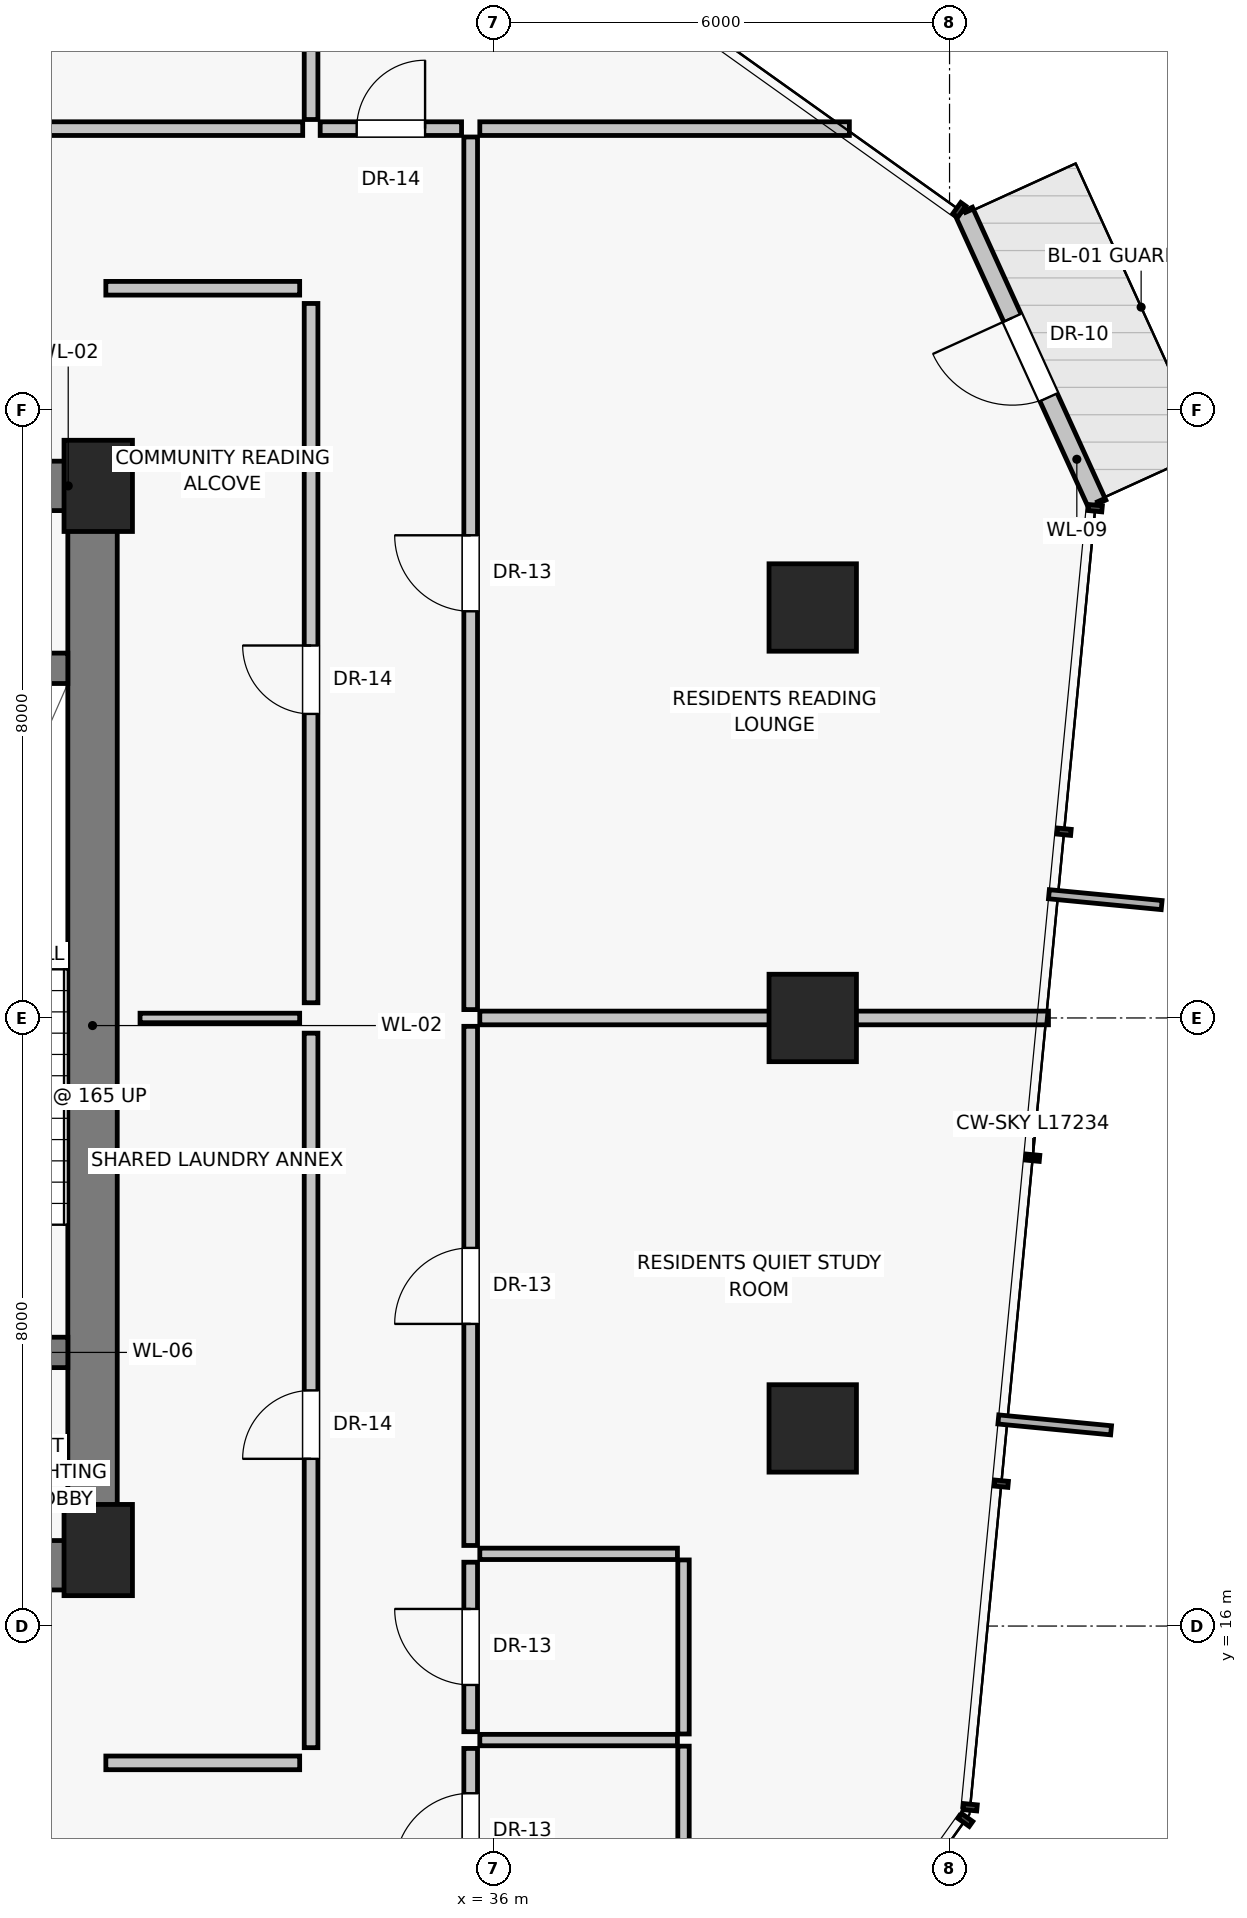
"""IFC4 building model, lengths in metres.
Left out: names, types, materials, properties, quantities, classifications, styles, units other than length and angle.
Written with IfcOpenShell. Run it as: python <this file> out.ifc"""

import sys

from ifc_helpers import new_model, si_unit, direction, frame, frame_2d, origin, origin_2d, place, context, subcontext, project, spatial, rectangle, extrude, source, transform, mapped, element, fill, save


model = new_model("IFC4")
c1 = context("Model", 3, precision=1e-05, world=origin(), true_north=direction((0.0, 1.0)))
c2 = subcontext(c1, "Body", "Model", "MODEL_VIEW")
j1 = project(units=[si_unit("LENGTHUNIT", "METRE"), si_unit("PLANEANGLEUNIT", "RADIAN")], contexts=[c1])
p1 = place(None, origin())
s1 = spatial("IfcSite", under=j1, at=p1, CompositionType="ELEMENT")
p2 = place(p1, origin())
s2 = spatial("IfcBuilding", under=s1, at=p2, CompositionType="ELEMENT")
p3 = place(p2, frame((0.0, 0.0, 108.95)))
s3 = spatial("IfcBuildingStorey", under=s2, at=p3, CompositionType="ELEMENT", Elevation=108.95)
for number, where, z_axis, x_axis in (
    (1, (30.8, 17.0, 0.0), (0.0, 0.0, 1.0), (1.0, 0.0, 0.0)),
    (2, (30.8, 31.0, 0.0), (0.0, 0.0, 1.0), (1.0, 0.0, 0.0)),
):
    element("IfcColumn", number, at=place(p3, frame(where, z_axis=z_axis, x_axis=x_axis)), inside=s3, PredefinedType="PILASTER", context=c2, shape_type="SweptSolid", body=[
        extrude(rectangle(XDim=0.9, YDim=1.2, at=origin_2d()), origin(), (0.0, 0.0, 1.0), 4.3),
    ])
for number, where, z_axis, x_axis in (
    (3, (40.2, 18.6, 0.0), (0.0, 0.0, 1.0), (1.0, 0.0, 0.0)),
    (4, (40.2, 24.0, 0.0), (0.0, 0.0, 1.0), (1.0, 0.0, 0.0)),
    (5, (40.2, 29.4, 0.0), (0.0, 0.0, 1.0), (1.0, 0.0, 0.0)),
):
    element("IfcColumn", number, at=place(p3, frame(where, z_axis=z_axis, x_axis=x_axis)), inside=s3, PredefinedType="COLUMN", context=c2, shape_type="SweptSolid", body=[
        extrude(rectangle(XDim=1.15, YDim=1.15, at=origin_2d()), origin(), (0.0, 0.0, 1.0), 4.3),
    ])
p4 = place(p3, frame((43.942, 30.762, 0.0), z_axis=(0.0, 0.0, 1.0), x_axis=(-0.414671807114, 0.909971039311, 0.0)))
e6 = element("IfcWall", 6, at=p4, inside=s3, PredefinedType="SOLIDWALL", context=c2, shape_type="SweptSolid", body=[
    extrude(rectangle(XDim=4.233, YDim=0.25, at=frame_2d((2.117, 0.0))), origin(), (0.0, 0.0, 1.0), 4.05),
])
p5 = place(p4, frame((1.542, 0.0, 0.0)))
e7 = element("IfcOpeningElement", 7, at=p5, cuts=e6, PredefinedType="OPENING", context=c2, shape_type="SweptSolid", body=[
    extrude(rectangle(XDim=1.15, YDim=2.25, at=frame_2d((0.575, 1.125))), frame((0.0, 0.135, 0.0), z_axis=(0.0, -1.0, 0.0), x_axis=(1.0, 0.0, 0.0)), (0.0, 0.0, 1.0), 0.27),
])
p6 = place(p3, frame((30.725, 16.8, 0.0), z_axis=(0.0, 0.0, 1.0), x_axis=(0.0, 1.0, 0.0)))
e8 = element("IfcWall", 8, at=p6, inside=s3, PredefinedType="SHEAR", context=c2, shape_type="SweptSolid", body=[
    extrude(rectangle(XDim=14.2, YDim=0.65, at=frame_2d((7.1, 0.0))), origin(), (0.0, 0.0, 1.0), 4.05),
])
p7 = place(p3, frame((24.95, 16.8, 0.0), z_axis=(0.0, 0.0, 1.0), x_axis=(1.0, 0.0, 0.0)))
e9 = element("IfcWall", 9, at=p7, inside=s3, PredefinedType="SHEAR", context=c2, shape_type="SweptSolid", body=[
    extrude(rectangle(XDim=5.85, YDim=0.65, at=frame_2d((2.925, 0.0))), origin(), (0.0, 0.0, 1.0), 4.05),
])
p8 = place(p7, frame((2.15, 0.0, 0.0)))
e10 = element("IfcOpeningElement", 10, at=p8, cuts=e9, PredefinedType="OPENING", context=c2, shape_type="SweptSolid", body=[
    extrude(rectangle(XDim=1.2, YDim=2.03, at=frame_2d((0.6, 1.015))), frame((0.0, 0.335, 0.0), z_axis=(0.0, -1.0, 0.0), x_axis=(1.0, 0.0, 0.0)), (0.0, 0.0, 1.0), 0.67),
])
p9 = place(p3, frame((27.0, 31.0, 0.0), z_axis=(0.0, 0.0, 1.0), x_axis=(1.0, 0.0, 0.0)))
e11 = element("IfcWall", 11, at=p9, inside=s3, PredefinedType="SHEAR", context=c2, shape_type="SweptSolid", body=[
    extrude(rectangle(XDim=3.8, YDim=0.65, at=frame_2d((1.9, 0.0))), origin(), (0.0, 0.0, 1.0), 4.05),
])
p10 = place(p9, frame((0.45, 0.0, 0.0)))
e12 = element("IfcOpeningElement", 12, at=p10, cuts=e11, PredefinedType="OPENING", context=c2, shape_type="SweptSolid", body=[
    extrude(rectangle(XDim=0.86, YDim=2.01, at=frame_2d((0.43, 1.005))), frame((0.0, 0.335, 0.0), z_axis=(0.0, -1.0, 0.0), x_axis=(1.0, 0.0, 0.0)), (0.0, 0.0, 1.0), 0.67),
])
p11 = place(p9, frame((1.9, 0.0, 0.0)))
e13 = element("IfcOpeningElement", 13, at=p11, cuts=e11, PredefinedType="OPENING", context=c2, shape_type="SweptSolid", body=[
    extrude(rectangle(XDim=0.86, YDim=2.01, at=frame_2d((0.43, 1.005))), frame((0.0, 0.335, 0.0), z_axis=(0.0, -1.0, 0.0), x_axis=(1.0, 0.0, 0.0)), (0.0, 0.0, 1.0), 0.67),
])
p12 = place(p3, frame((27.0, 19.6, 0.0), z_axis=(0.0, 0.0, 1.0), x_axis=(1.0, 0.0, 0.0)))
e14 = element("IfcWall", 14, at=p12, inside=s3, PredefinedType="SHEAR", context=c2, shape_type="SweptSolid", body=[
    extrude(rectangle(XDim=3.4, YDim=0.4, at=frame_2d((1.7, 0.0))), origin(), (0.0, 0.0, 1.0), 4.05),
])
p13 = place(p12, frame((1.05, 0.0, 0.0)))
e15 = element("IfcOpeningElement", 15, at=p13, cuts=e14, PredefinedType="OPENING", context=c2, shape_type="SweptSolid", body=[
    extrude(rectangle(XDim=1.1, YDim=2.03, at=frame_2d((0.55, 1.015))), frame((0.0, 0.21, 0.0), z_axis=(0.0, -1.0, 0.0), x_axis=(1.0, 0.0, 0.0)), (0.0, 0.0, 1.0), 0.42),
])
p14 = place(p3, frame((27.0, 28.6, 0.0), z_axis=(0.0, 0.0, 1.0), x_axis=(1.0, 0.0, 0.0)))
e16 = element("IfcWall", 16, at=p14, inside=s3, PredefinedType="SHEAR", context=c2, shape_type="SweptSolid", body=[
    extrude(rectangle(XDim=3.4, YDim=0.4, at=frame_2d((1.7, 0.0))), origin(), (0.0, 0.0, 1.0), 4.05),
])
p15 = place(p3, frame((33.6, 14.4, 0.0), z_axis=(0.0, 0.0, 1.0), x_axis=(0.0, 1.0, 0.0)))
e17 = element("IfcWall", 17, at=p15, inside=s3, PredefinedType="PARTITIONING", context=c2, shape_type="SweptSolid", body=[
    extrude(rectangle(XDim=9.4, YDim=0.18, at=frame_2d((4.7, 0.0))), origin(), (0.0, 0.0, 1.0), 4.05),
])
p16 = place(p15, frame((3.8, 0.0, 0.0)))
e18 = element("IfcOpeningElement", 18, at=p16, cuts=e17, PredefinedType="OPENING", context=c2, shape_type="SweptSolid", body=[
    extrude(rectangle(XDim=0.9, YDim=2.01, at=frame_2d((0.45, 1.005))), frame((0.0, 0.1, 0.0), z_axis=(0.0, -1.0, 0.0), x_axis=(1.0, 0.0, 0.0)), (0.0, 0.0, 1.0), 0.2),
])
p17 = place(p3, frame((33.6, 24.2, 0.0), z_axis=(0.0, 0.0, 1.0), x_axis=(0.0, 1.0, 0.0)))
e19 = element("IfcWall", 19, at=p17, inside=s3, PredefinedType="PARTITIONING", context=c2, shape_type="SweptSolid", body=[
    extrude(rectangle(XDim=9.2, YDim=0.18, at=frame_2d((4.6, 0.0))), origin(), (0.0, 0.0, 1.0), 4.05),
])
p18 = place(p17, frame((3.8, 0.0, 0.0)))
e20 = element("IfcOpeningElement", 20, at=p18, cuts=e19, PredefinedType="OPENING", context=c2, shape_type="SweptSolid", body=[
    extrude(rectangle(XDim=0.9, YDim=2.01, at=frame_2d((0.45, 1.005))), frame((0.0, 0.1, 0.0), z_axis=(0.0, -1.0, 0.0), x_axis=(1.0, 0.0, 0.0)), (0.0, 0.0, 1.0), 0.2),
])
p19 = place(p3, frame((31.35, 24.0, 0.0), z_axis=(0.0, 0.0, 1.0), x_axis=(1.0, 0.0, 0.0)))
e21 = element("IfcWall", 21, at=p19, inside=s3, PredefinedType="PARTITIONING", context=c2, shape_type="SweptSolid", body=[
    extrude(rectangle(XDim=2.1, YDim=0.125, at=frame_2d((1.05, 0.0))), origin(), (0.0, 0.0, 1.0), 4.05),
])
for number, where, z_axis, x_axis in (
    (22, (30.9, 14.2, 0.0), (0.0, 0.0, 1.0), (1.0, 0.0, 0.0)),
    (23, (30.9, 33.6, 0.0), (0.0, 0.0, 1.0), (1.0, 0.0, 0.0)),
):
    element("IfcWall", number, at=place(p3, frame(where, z_axis=z_axis, x_axis=x_axis)), inside=s3, PredefinedType="PARTITIONING", context=c2, shape_type="SweptSolid", body=[
        extrude(rectangle(XDim=2.55, YDim=0.18, at=frame_2d((1.275, 0.0))), origin(), (0.0, 0.0, 1.0), 4.05),
    ])
p20 = place(p3, frame((33.6, 35.82, 0.0), z_axis=(0.0, 0.0, 1.0), x_axis=(0.0, 1.0, 0.0)))
e24 = element("IfcWall", 24, at=p20, inside=s3, PredefinedType="PARTITIONING", context=c2, shape_type="SweptSolid", body=[
    extrude(rectangle(XDim=4.932, YDim=0.18, at=frame_2d((2.466, 0.0))), origin(), (0.0, 0.0, 1.0), 4.05),
])
p21 = place(p3, frame((25.454, 35.7, 0.0), z_axis=(0.0, 0.0, 1.0), x_axis=(1.0, 0.0, 0.0)))
e25 = element("IfcWall", 25, at=p21, inside=s3, PredefinedType="PARTITIONING", context=c2, shape_type="SweptSolid", body=[
    extrude(rectangle(XDim=8.036, YDim=0.18, at=frame_2d((4.018, 0.0))), origin(), (0.0, 0.0, 1.0), 3.63),
])
p22 = place(p21, frame((3.518, 0.0, 0.0)))
e26 = element("IfcOpeningElement", 26, at=p22, cuts=e25, PredefinedType="OPENING", context=c2, shape_type="SweptSolid", body=[
    extrude(rectangle(XDim=1.0, YDim=2.01, at=frame_2d((0.5, 1.005))), frame((0.0, 0.1, 0.0), z_axis=(0.0, -1.0, 0.0), x_axis=(1.0, 0.0, 0.0)), (0.0, 0.0, 1.0), 0.2),
])
p23 = place(p3, frame((35.82, 35.7, 0.0), z_axis=(0.0, 0.0, 1.0), x_axis=(1.0, 0.0, 0.0)))
e27 = element("IfcWall", 27, at=p23, inside=s3, PredefinedType="PARTITIONING", context=c2, shape_type="SweptSolid", body=[
    extrude(rectangle(XDim=4.862, YDim=0.18, at=frame_2d((2.431, 0.0))), origin(), (0.0, 0.0, 1.0), 4.05),
])
p24 = place(p3, frame((35.7, 12.21, 0.0), z_axis=(0.0, 0.0, 1.0), x_axis=(0.0, 1.0, 0.0)))
e28 = element("IfcWall", 28, at=p24, inside=s3, PredefinedType="PARTITIONING", context=c2, shape_type="SweptSolid", body=[
    extrude(rectangle(XDim=2.18, YDim=0.18, at=frame_2d((1.09, 0.0))), origin(), (0.0, 0.0, 1.0), 4.05),
])
p25 = place(p24, frame((0.59, 0.0, 0.0)))
e29 = element("IfcOpeningElement", 29, at=p25, cuts=e28, PredefinedType="OPENING", context=c2, shape_type="SweptSolid", body=[
    extrude(rectangle(XDim=1.0, YDim=2.01, at=frame_2d((0.5, 1.005))), frame((0.0, 0.1, 0.0), z_axis=(0.0, -1.0, 0.0), x_axis=(1.0, 0.0, 0.0)), (0.0, 0.0, 1.0), 0.2),
])
p26 = place(p3, frame((35.7, 14.61, 0.0), z_axis=(0.0, 0.0, 1.0), x_axis=(0.0, 1.0, 0.0)))
e30 = element("IfcWall", 30, at=p26, inside=s3, PredefinedType="PARTITIONING", context=c2, shape_type="SweptSolid", body=[
    extrude(rectangle(XDim=2.23, YDim=0.18, at=frame_2d((1.115, 0.0))), origin(), (0.0, 0.0, 1.0), 4.05),
])
p27 = place(p26, frame((0.615, 0.0, 0.0)))
e31 = element("IfcOpeningElement", 31, at=p27, cuts=e30, PredefinedType="OPENING", context=c2, shape_type="SweptSolid", body=[
    extrude(rectangle(XDim=1.0, YDim=2.01, at=frame_2d((0.5, 1.005))), frame((0.0, 0.1, 0.0), z_axis=(0.0, -1.0, 0.0), x_axis=(1.0, 0.0, 0.0)), (0.0, 0.0, 1.0), 0.2),
])
p28 = place(p3, frame((35.7, 17.06, 0.0), z_axis=(0.0, 0.0, 1.0), x_axis=(0.0, 1.0, 0.0)))
e32 = element("IfcWall", 32, at=p28, inside=s3, PredefinedType="PARTITIONING", context=c2, shape_type="SweptSolid", body=[
    extrude(rectangle(XDim=6.83, YDim=0.18, at=frame_2d((3.415, 0.0))), origin(), (0.0, 0.0, 1.0), 3.63),
])
p29 = place(p28, frame((2.915, 0.0, 0.0)))
e33 = element("IfcOpeningElement", 33, at=p29, cuts=e32, PredefinedType="OPENING", context=c2, shape_type="SweptSolid", body=[
    extrude(rectangle(XDim=1.0, YDim=2.01, at=frame_2d((0.5, 1.005))), frame((0.0, 0.1, 0.0), z_axis=(0.0, -1.0, 0.0), x_axis=(1.0, 0.0, 0.0)), (0.0, 0.0, 1.0), 0.2),
])
p30 = place(p3, frame((35.7, 24.11, 0.0), z_axis=(0.0, 0.0, 1.0), x_axis=(0.0, 1.0, 0.0)))
e34 = element("IfcWall", 34, at=p30, inside=s3, PredefinedType="PARTITIONING", context=c2, shape_type="SweptSolid", body=[
    extrude(rectangle(XDim=11.48, YDim=0.18, at=frame_2d((5.74, 0.0))), origin(), (0.0, 0.0, 1.0), 3.63),
])
p31 = place(p30, frame((5.24, 0.0, 0.0)))
e35 = element("IfcOpeningElement", 35, at=p31, cuts=e34, PredefinedType="OPENING", context=c2, shape_type="SweptSolid", body=[
    extrude(rectangle(XDim=1.0, YDim=2.01, at=frame_2d((0.5, 1.005))), frame((0.0, 0.1, 0.0), z_axis=(0.0, -1.0, 0.0), x_axis=(1.0, 0.0, 0.0)), (0.0, 0.0, 1.0), 0.2),
])
for number, where, z_axis, x_axis in (
    (36, (35.82, 14.5, 0.0), (0.0, 0.0, 1.0), (1.0, 0.0, 0.0)),
    (37, (35.82, 16.95, 0.0), (0.0, 0.0, 1.0), (1.0, 0.0, 0.0)),
):
    element("IfcWall", number, at=place(p3, frame(where, z_axis=z_axis, x_axis=x_axis)), inside=s3, PredefinedType="PARTITIONING", context=c2, shape_type="SweptSolid", body=[
        extrude(rectangle(XDim=2.6, YDim=0.15, at=frame_2d((1.3, 0.0))), origin(), (0.0, 0.0, 1.0), 4.05),
    ])
p32 = place(p3, frame((38.5, 12.22, 0.0), z_axis=(0.0, 0.0, 1.0), x_axis=(0.0, 1.0, 0.0)))
e38 = element("IfcWall", 38, at=p32, inside=s3, PredefinedType="PARTITIONING", context=c2, shape_type="SweptSolid", body=[
    extrude(rectangle(XDim=2.2, YDim=0.15, at=frame_2d((1.1, 0.0))), origin(), (0.0, 0.0, 1.0), 4.05),
])
p33 = place(p3, frame((38.5, 14.58, 0.0), z_axis=(0.0, 0.0, 1.0), x_axis=(0.0, 1.0, 0.0)))
e39 = element("IfcWall", 39, at=p33, inside=s3, PredefinedType="PARTITIONING", context=c2, shape_type="SweptSolid", body=[
    extrude(rectangle(XDim=2.29, YDim=0.15, at=frame_2d((1.145, 0.0))), origin(), (0.0, 0.0, 1.0), 4.05),
])
p34 = place(p3, frame((35.82, 24.0, 0.0), z_axis=(0.0, 0.0, 1.0), x_axis=(1.0, 0.0, 0.0)))
e40 = element("IfcWall", 40, at=p34, inside=s3, PredefinedType="PARTITIONING", context=c2, shape_type="SweptSolid", body=[
    extrude(rectangle(XDim=7.481, YDim=0.18, at=frame_2d((3.741, 0.0))), origin(), (0.0, 0.0, 1.0), 4.05),
])
p35 = place(p3, frame((33.72, 35.7, 0.0), z_axis=(0.0, 0.0, 1.0), x_axis=(1.0, 0.0, 0.0)))
e41 = element("IfcWall", 41, at=p35, inside=s3, PredefinedType="PARTITIONING", context=c2, shape_type="SweptSolid", body=[
    extrude(rectangle(XDim=1.86, YDim=0.18, at=frame_2d((0.93, 0.0))), origin(), (0.0, 0.0, 1.0), 4.05),
])
p36 = place(p35, frame((0.48, 0.0, 0.0)))
e42 = element("IfcOpeningElement", 42, at=p36, cuts=e41, PredefinedType="OPENING", context=c2, shape_type="SweptSolid", body=[
    extrude(rectangle(XDim=0.9, YDim=2.01, at=frame_2d((0.45, 1.005))), frame((0.0, 0.1, 0.0), z_axis=(0.0, -1.0, 0.0), x_axis=(1.0, 0.0, 0.0)), (0.0, 0.0, 1.0), 0.2),
])
m1 = source(origin(), c2, "Body", "SweptSolid", [
    extrude(rectangle(XDim=1.15, YDim=2.25, at=frame_2d((0.575, 1.125))), frame((0.0, 0.025, 0.0), z_axis=(0.0, -1.0, 0.0), x_axis=(1.0, 0.0, 0.0)), (0.0, 0.0, 1.0), 0.05),
])
p37 = place(p5, frame((1.15, 0.0, 0.0), z_axis=(0.0, 0.0, 1.0), x_axis=(-1.0, 0.0, 0.0)))
e43 = element("IfcDoor", 43, at=p37, inside=s3, OperationType="SINGLE_SWING_RIGHT", PredefinedType="DOOR", context=c2, shape_type="MappedRepresentation", body=[
    mapped(m1, transform((0.0, 0.0, 0.0), scale=1.0)),
])
fill(e7, e43)
m2 = source(origin(), c2, "Body", "SweptSolid", [
    extrude(rectangle(XDim=0.9, YDim=2.01, at=frame_2d((0.45, 1.005))), frame((0.0, 0.025, 0.0), z_axis=(0.0, -1.0, 0.0), x_axis=(1.0, 0.0, 0.0)), (0.0, 0.0, 1.0), 0.05),
])
p38 = place(p16, origin())
e44 = element("IfcDoor", 44, at=p38, inside=s3, OperationType="SINGLE_SWING_LEFT", PredefinedType="DOOR", context=c2, shape_type="MappedRepresentation", body=[
    mapped(m2, transform((0.0, 0.0, 0.0), scale=1.0)),
])
fill(e18, e44)
p39 = place(p18, origin())
e45 = element("IfcDoor", 45, at=p39, inside=s3, OperationType="SINGLE_SWING_RIGHT", PredefinedType="DOOR", context=c2, shape_type="MappedRepresentation", body=[
    mapped(m2, transform((0.0, 0.0, 0.0), scale=1.0)),
])
fill(e20, e45)
m3 = source(origin(), c2, "Body", "SweptSolid", [
    extrude(rectangle(XDim=1.0, YDim=2.01, at=frame_2d((0.5, 1.005))), frame((0.0, 0.025, 0.0), z_axis=(0.0, -1.0, 0.0), x_axis=(1.0, 0.0, 0.0)), (0.0, 0.0, 1.0), 0.05),
])
p40 = place(p25, origin())
e46 = element("IfcDoor", 46, at=p40, inside=s3, OperationType="SINGLE_SWING_LEFT", PredefinedType="DOOR", context=c2, shape_type="MappedRepresentation", body=[
    mapped(m3, transform((0.0, 0.0, 0.0), scale=1.0)),
])
fill(e29, e46)
p41 = place(p27, origin())
e47 = element("IfcDoor", 47, at=p41, inside=s3, OperationType="SINGLE_SWING_RIGHT", PredefinedType="DOOR", context=c2, shape_type="MappedRepresentation", body=[
    mapped(m3, transform((0.0, 0.0, 0.0), scale=1.0)),
])
fill(e31, e47)
p42 = place(p29, origin())
e48 = element("IfcDoor", 48, at=p42, inside=s3, OperationType="SINGLE_SWING_LEFT", PredefinedType="DOOR", context=c2, shape_type="MappedRepresentation", body=[
    mapped(m3, transform((0.0, 0.0, 0.0), scale=1.0)),
])
fill(e33, e48)
p43 = place(p31, origin())
e49 = element("IfcDoor", 49, at=p43, inside=s3, OperationType="SINGLE_SWING_RIGHT", PredefinedType="DOOR", context=c2, shape_type="MappedRepresentation", body=[
    mapped(m3, transform((0.0, 0.0, 0.0), scale=1.0)),
])
fill(e35, e49)
p44 = place(p36, origin())
e50 = element("IfcDoor", 50, at=p44, inside=s3, OperationType="SINGLE_SWING_RIGHT", PredefinedType="DOOR", context=c2, shape_type="MappedRepresentation", body=[
    mapped(m2, transform((0.0, 0.0, 0.0), scale=1.0)),
])
fill(e42, e50)
save(model, sys.argv[1])
